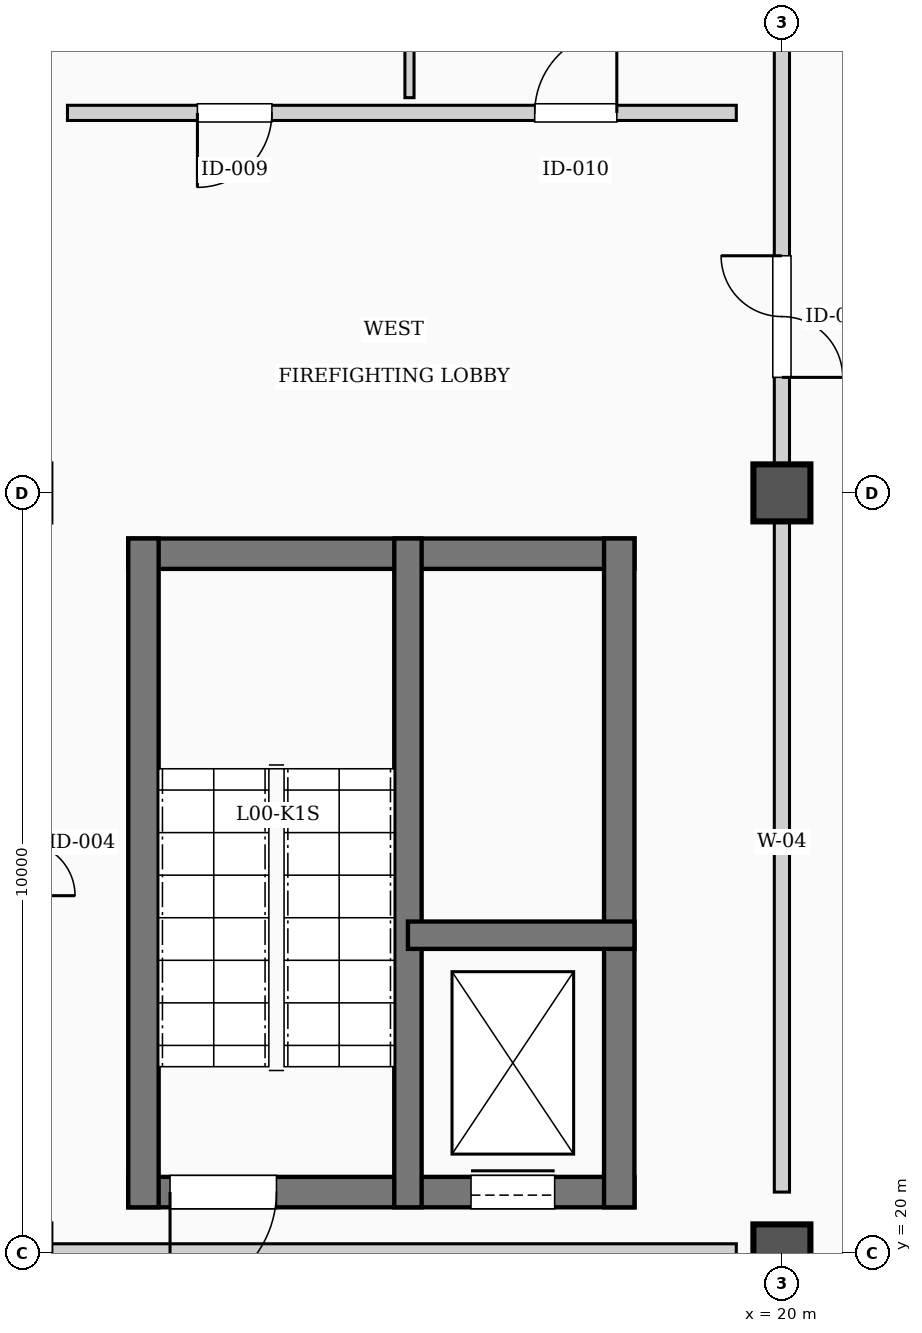
"""IFC4 building model, lengths in metres.
Left out: names, types, materials, properties, quantities, classifications, styles, units other than length and angle.
Written with IfcOpenShell. Run it as: python <this file> out.ifc"""

import sys

from ifc_helpers import new_model, si_unit, direction, frame, frame_2d, origin, origin_2d, place, context, subcontext, project, spatial, rectangle, extrude, element, fill, save


model = new_model("IFC4")
c1 = context("Model", 3, precision=1e-05, world=origin(), true_north=direction((0.0, 1.0)))
c2 = subcontext(c1, "Body", "Model", "MODEL_VIEW")
j1 = project(units=[si_unit("LENGTHUNIT", "METRE"), si_unit("PLANEANGLEUNIT", "RADIAN")], contexts=[c1])
p1 = place(None, origin())
s1 = spatial("IfcSite", under=j1, at=p1, CompositionType="ELEMENT")
p2 = place(p1, origin())
s2 = spatial("IfcBuilding", under=s1, at=p2, CompositionType="ELEMENT")
p3 = place(p2, origin())
s3 = spatial("IfcBuildingStorey", under=s2, at=p3, CompositionType="ELEMENT", Elevation=0.0)
for number, where, z_axis, x_axis in (
    (1, (20.0, 20.0, 0.0), (0.0, 0.0, 1.0), (1.0, 0.0, 0.0)),
    (2, (20.0, 30.0, 0.0), (0.0, 0.0, 1.0), (1.0, 0.0, 0.0)),
):
    element("IfcColumn", number, at=place(p3, frame(where, z_axis=z_axis, x_axis=x_axis)), inside=s3, PredefinedType="COLUMN", context=c2, shape_type="SweptSolid", body=[
        extrude(rectangle(XDim=0.75, YDim=0.75, at=origin_2d()), origin(), (0.0, 0.0, 1.0), 5.4),
    ])
p4 = place(p3, frame((11.4, 20.8, 0.0), z_axis=(0.0, 0.0, 1.0), x_axis=(1.0, 0.0, 0.0)))
e3 = element("IfcWall", 3, at=p4, inside=s3, PredefinedType="SHEAR", context=c2, shape_type="SweptSolid", body=[
    extrude(rectangle(XDim=6.66, YDim=0.4, at=frame_2d((3.33, 0.0))), origin(), (0.0, 0.0, 1.0), 5.4),
])
p5 = place(p4, frame((0.55, 0.0, 0.0)))
e4 = element("IfcOpeningElement", 4, at=p5, cuts=e3, PredefinedType="OPENING", context=c2, shape_type="SweptSolid", body=[
    extrude(rectangle(XDim=1.4, YDim=2.35, at=frame_2d((0.7, 1.175))), frame((0.0, 0.21, 0.0), z_axis=(0.0, -1.0, 0.0), x_axis=(1.0, 0.0, 0.0)), (0.0, 0.0, 1.0), 0.42),
])
p6 = place(p4, frame((4.51, 0.0, 0.0)))
e5 = element("IfcOpeningElement", 5, at=p6, cuts=e3, PredefinedType="OPENING", context=c2, shape_type="SweptSolid", body=[
    extrude(rectangle(XDim=1.1, YDim=2.3, at=frame_2d((0.55, 1.15))), frame((0.0, 0.21, 0.0), z_axis=(0.0, -1.0, 0.0), x_axis=(1.0, 0.0, 0.0)), (0.0, 0.0, 1.0), 0.42),
])
p7 = place(p3, frame((11.4, 29.2, 0.0), z_axis=(0.0, 0.0, 1.0), x_axis=(1.0, 0.0, 0.0)))
e6 = element("IfcWall", 6, at=p7, inside=s3, PredefinedType="SHEAR", context=c2, shape_type="SweptSolid", body=[
    extrude(rectangle(XDim=6.66, YDim=0.4, at=frame_2d((3.33, 0.0))), origin(), (0.0, 0.0, 1.0), 5.4),
])
for number, where, z_axis, x_axis in (
    (7, (11.6, 20.6, 0.0), (0.0, 0.0, 1.0), (0.0, 1.0, 0.0)),
    (8, (17.86, 20.6, 0.0), (0.0, 0.0, 1.0), (0.0, 1.0, 0.0)),
):
    element("IfcWall", number, at=place(p3, frame(where, z_axis=z_axis, x_axis=x_axis)), inside=s3, PredefinedType="SHEAR", context=c2, shape_type="SweptSolid", body=[
        extrude(rectangle(XDim=8.8, YDim=0.4, at=frame_2d((4.4, 0.0))), origin(), (0.0, 0.0, 1.0), 5.4),
    ])
p8 = place(p3, frame((15.08, 20.6, 0.0), z_axis=(0.0, 0.0, 1.0), x_axis=(0.0, 1.0, 0.0)))
e9 = element("IfcWall", 9, at=p8, inside=s3, PredefinedType="SHEAR", context=c2, shape_type="SweptSolid", body=[
    extrude(rectangle(XDim=8.8, YDim=0.36, at=frame_2d((4.4, 0.0))), origin(), (0.0, 0.0, 1.0), 5.4),
])
p9 = place(p3, frame((15.08, 24.18, 0.0), z_axis=(0.0, 0.0, 1.0), x_axis=(1.0, 0.0, 0.0)))
e10 = element("IfcWall", 10, at=p9, inside=s3, PredefinedType="SHEAR", context=c2, shape_type="SweptSolid", body=[
    extrude(rectangle(XDim=2.98, YDim=0.36, at=frame_2d((1.49, 0.0))), origin(), (0.0, 0.0, 1.0), 5.4),
])
p10 = place(p3, frame((0.8, 20.0, 0.0), z_axis=(0.0, 0.0, 1.0), x_axis=(1.0, 0.0, 0.0)))
e11 = element("IfcWall", 11, at=p10, inside=s3, PredefinedType="PARTITIONING", context=c2, shape_type="SweptSolid", body=[
    extrude(rectangle(XDim=18.6, YDim=0.24, at=frame_2d((9.3, 0.0))), origin(), (0.0, 0.0, 1.0), 4.54),
])
p11 = place(p10, frame((4.58, 0.0, 0.0)))
e12 = element("IfcOpeningElement", 12, at=p11, cuts=e11, PredefinedType="OPENING", context=c2, shape_type="SweptSolid", body=[
    extrude(rectangle(XDim=2.0, YDim=2.45, at=frame_2d((1.0, 1.225))), frame((0.0, 0.13, 0.0), z_axis=(0.0, -1.0, 0.0), x_axis=(1.0, 0.0, 0.0)), (0.0, 0.0, 1.0), 0.26),
])
p12 = place(p3, frame((20.0, 20.8, 0.0), z_axis=(0.0, 0.0, 1.0), x_axis=(0.0, 1.0, 0.0)))
e13 = element("IfcWall", 13, at=p12, inside=s3, PredefinedType="PARTITIONING", context=c2, shape_type="SweptSolid", body=[
    extrude(rectangle(XDim=38.4, YDim=0.2, at=frame_2d((19.2, 0.0))), origin(), (0.0, 0.0, 1.0), 4.49),
])
p13 = place(p12, frame((10.72, 0.0, 0.0)))
e14 = element("IfcOpeningElement", 14, at=p13, cuts=e13, PredefinedType="OPENING", context=c2, shape_type="SweptSolid", body=[
    extrude(rectangle(XDim=1.6, YDim=2.4, at=frame_2d((0.8, 1.2))), frame((0.0, 0.11, 0.0), z_axis=(0.0, -1.0, 0.0), x_axis=(1.0, 0.0, 0.0)), (0.0, 0.0, 1.0), 0.22),
])
p14 = place(p12, frame((21.697, 0.0, 0.0)))
e15 = element("IfcOpeningElement", 15, at=p14, cuts=e13, PredefinedType="OPENING", context=c2, shape_type="SweptSolid", body=[
    extrude(rectangle(XDim=1.15, YDim=2.35, at=frame_2d((0.575, 1.175))), frame((0.0, 0.11, 0.0), z_axis=(0.0, -1.0, 0.0), x_axis=(1.0, 0.0, 0.0)), (0.0, 0.0, 1.0), 0.22),
])
p15 = place(p12, frame((26.648, 0.0, 0.0)))
e16 = element("IfcOpeningElement", 16, at=p15, cuts=e13, PredefinedType="OPENING", context=c2, shape_type="SweptSolid", body=[
    extrude(rectangle(XDim=2.0, YDim=2.45, at=frame_2d((1.0, 1.225))), frame((0.0, 0.11, 0.0), z_axis=(0.0, -1.0, 0.0), x_axis=(1.0, 0.0, 0.0)), (0.0, 0.0, 1.0), 0.22),
])
p16 = place(p3, frame((10.6, 35.0, 0.0), z_axis=(0.0, 0.0, 1.0), x_axis=(1.0, 0.0, 0.0)))
e17 = element("IfcWall", 17, at=p16, inside=s3, PredefinedType="PARTITIONING", context=c2, shape_type="SweptSolid", body=[
    extrude(rectangle(XDim=8.8, YDim=0.2, at=frame_2d((4.4, 0.0))), origin(), (0.0, 0.0, 1.0), 5.06),
])
p17 = place(p16, frame((1.71, 0.0, 0.0)))
e18 = element("IfcOpeningElement", 18, at=p17, cuts=e17, PredefinedType="OPENING", context=c2, shape_type="SweptSolid", body=[
    extrude(rectangle(XDim=0.98, YDim=2.3, at=frame_2d((0.49, 1.15))), frame((0.0, 0.11, 0.0), z_axis=(0.0, -1.0, 0.0), x_axis=(1.0, 0.0, 0.0)), (0.0, 0.0, 1.0), 0.22),
])
p18 = place(p16, frame((6.148, 0.0, 0.0)))
e19 = element("IfcOpeningElement", 19, at=p18, cuts=e17, PredefinedType="OPENING", context=c2, shape_type="SweptSolid", body=[
    extrude(rectangle(XDim=1.08, YDim=2.35, at=frame_2d((0.54, 1.175))), frame((0.0, 0.11, 0.0), z_axis=(0.0, -1.0, 0.0), x_axis=(1.0, 0.0, 0.0)), (0.0, 0.0, 1.0), 0.22),
])
p19 = place(p3, frame((15.1, 35.2, 0.0), z_axis=(0.0, 0.0, 1.0), x_axis=(0.0, 1.0, 0.0)))
e20 = element("IfcWall", 20, at=p19, inside=s3, PredefinedType="PARTITIONING", context=c2, shape_type="SweptSolid", body=[
    extrude(rectangle(XDim=4.6, YDim=0.12, at=frame_2d((2.3, 0.0))), origin(), (0.0, 0.0, 1.0), 5.06),
])
p20 = place(p5, origin())
e21 = element("IfcDoor", 21, at=p20, inside=s3, OperationType="SINGLE_SWING_LEFT", PredefinedType="DOOR", context=c2, shape_type="SweptSolid", body=[
    extrude(rectangle(XDim=1.4, YDim=2.35, at=frame_2d((0.7, 1.175))), frame((0.0, 0.025, 0.0), z_axis=(0.0, -1.0, 0.0), x_axis=(1.0, 0.0, 0.0)), (0.0, 0.0, 1.0), 0.05),
])
fill(e4, e21)
p21 = place(p6, origin())
e22 = element("IfcDoor", 22, at=p21, inside=s3, OperationType="SLIDING_TO_LEFT", PredefinedType="DOOR", context=c2, shape_type="SweptSolid", body=[
    extrude(rectangle(XDim=1.1, YDim=2.3, at=frame_2d((0.55, 1.15))), frame((0.0, 0.025, 0.0), z_axis=(0.0, -1.0, 0.0), x_axis=(1.0, 0.0, 0.0)), (0.0, 0.0, 1.0), 0.05),
])
fill(e5, e22)
p22 = place(p13, origin())
e23 = element("IfcDoor", 23, at=p22, inside=s3, OperationType="DOUBLE_DOOR_SINGLE_SWING", PredefinedType="DOOR", context=c2, shape_type="SweptSolid", body=[
    extrude(rectangle(XDim=1.6, YDim=2.4, at=frame_2d((0.8, 1.2))), frame((0.0, 0.025, 0.0), z_axis=(0.0, -1.0, 0.0), x_axis=(1.0, 0.0, 0.0)), (0.0, 0.0, 1.0), 0.05),
])
fill(e14, e23)
p23 = place(p17, origin())
e24 = element("IfcDoor", 24, at=p23, inside=s3, OperationType="SINGLE_SWING_LEFT", PredefinedType="DOOR", context=c2, shape_type="SweptSolid", body=[
    extrude(rectangle(XDim=0.98, YDim=2.3, at=frame_2d((0.49, 1.15))), frame((0.0, 0.025, 0.0), z_axis=(0.0, -1.0, 0.0), x_axis=(1.0, 0.0, 0.0)), (0.0, 0.0, 1.0), 0.05),
])
fill(e18, e24)
p24 = place(p18, origin())
e25 = element("IfcDoor", 25, at=p24, inside=s3, OperationType="SINGLE_SWING_RIGHT", PredefinedType="DOOR", context=c2, shape_type="SweptSolid", body=[
    extrude(rectangle(XDim=1.08, YDim=2.35, at=frame_2d((0.54, 1.175))), frame((0.0, 0.025, 0.0), z_axis=(0.0, -1.0, 0.0), x_axis=(1.0, 0.0, 0.0)), (0.0, 0.0, 1.0), 0.05),
])
fill(e19, e25)
save(model, sys.argv[1])
